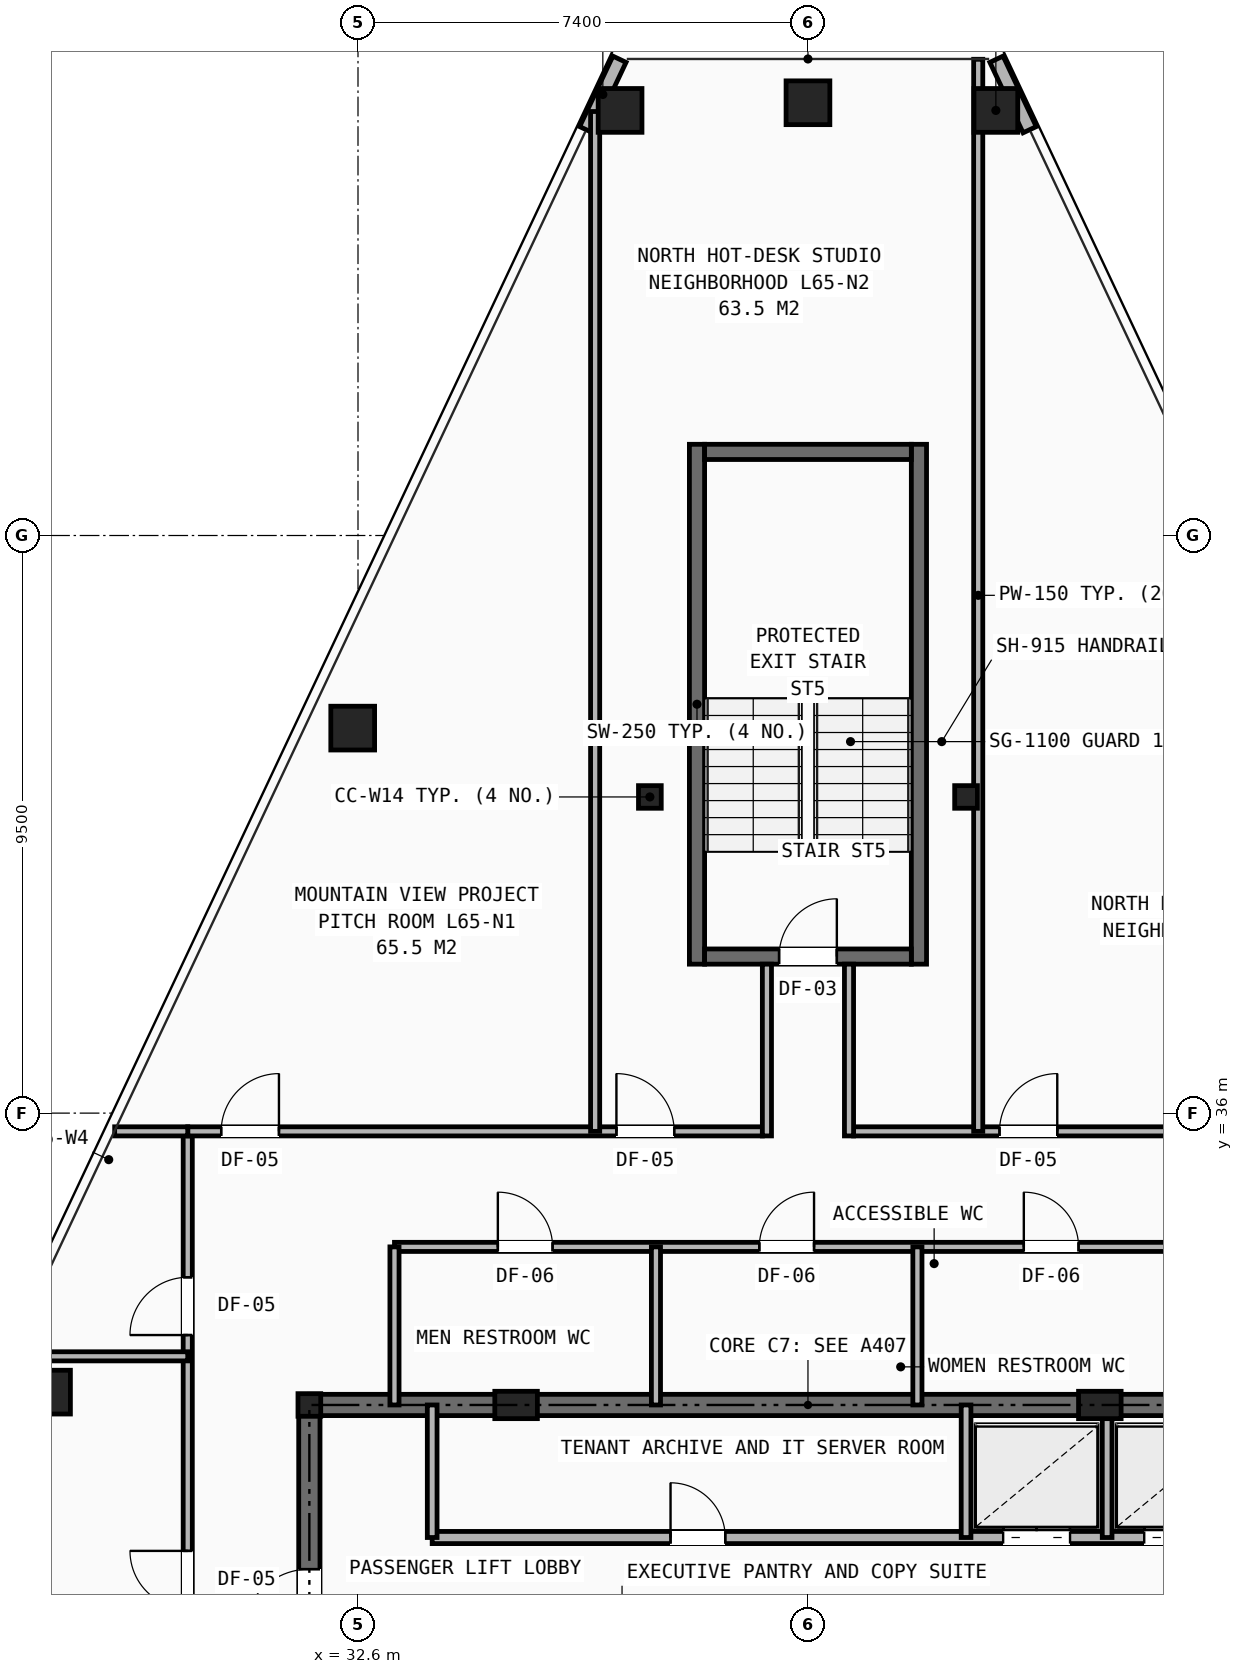
"""IFC4 building model, lengths in metres.
Left out: names, types, materials, properties, quantities, classifications, styles, units other than length and angle.
Written with IfcOpenShell. Run it as: python <this file> out.ifc"""

import sys

from ifc_helpers import new_model, si_unit, direction, frame, frame_2d, origin, origin_2d, place, context, subcontext, project, spatial, rectangle, hollow_rectangle, i_section, extrude, element, fill, save


model = new_model("IFC4")
c1 = context("Model", 3, precision=1e-05, world=origin(), true_north=direction((0.0, 1.0)))
c2 = subcontext(c1, "Body", "Model", "MODEL_VIEW")
j1 = project(units=[si_unit("LENGTHUNIT", "METRE"), si_unit("PLANEANGLEUNIT", "RADIAN")], contexts=[c1])
p1 = place(None, origin())
s1 = spatial("IfcSite", under=j1, at=p1, CompositionType="ELEMENT")
p2 = place(p1, origin())
s2 = spatial("IfcBuilding", under=s1, at=p2, CompositionType="ELEMENT")
p3 = place(p2, frame((0.0, 0.0, 229.4)))
s3 = spatial("IfcBuildingStorey", under=s2, at=p3, CompositionType="ELEMENT", Elevation=229.4)
for number, where, z_axis, x_axis in (
    (1, (31.8, 31.2, 0.0), (0.0, 0.0, 1.0), (1.0, 0.0, 0.0)),
    (2, (37.4, 41.2, 0.0), (0.0, 0.0, 1.0), (1.0, 0.0, 0.0)),
    (3, (42.6, 41.2, 0.0), (0.0, 0.0, 1.0), (1.0, 0.0, 0.0)),
):
    element("IfcColumn", number, at=place(p3, frame(where, z_axis=z_axis, x_axis=x_axis)), inside=s3, PredefinedType="COLUMN", context=c2, shape_type="SweptSolid", body=[
        extrude(i_section(OverallWidth=0.374, OverallDepth=0.372, WebThickness=0.016, FlangeThickness=0.026, at=origin_2d()), origin(), (0.0, 0.0, 1.0), 3.5),
    ])
for number, where, z_axis, x_axis in (
    (4, (35.2, 31.2, 0.0), (0.0, 0.0, 1.0), (1.0, 0.0, 0.0)),
    (5, (44.8, 31.2, 0.0), (0.0, 0.0, 1.0), (1.0, 0.0, 0.0)),
):
    element("IfcColumn", number, at=place(p3, frame(where, z_axis=z_axis, x_axis=x_axis)), inside=s3, PredefinedType="PILASTER", context=c2, shape_type="SweptSolid", body=[
        extrude(rectangle(XDim=0.7, YDim=0.45, at=origin_2d()), origin(), (0.0, 0.0, 1.0), 3.5),
    ])
for number, where, z_axis, x_axis in (
    (6, (43.09, 52.491, 0.0), (0.0, 0.0, 1.0), (1.0, 0.0, 0.0)),
    (7, (40.0, 52.617, 0.0), (0.0, 0.0, 1.0), (1.0, 0.0, 0.0)),
    (8, (36.91, 52.491, 0.0), (0.0, 0.0, 1.0), (1.0, 0.0, 0.0)),
    (9, (32.513, 42.332, 0.0), (0.0, 0.0, 1.0), (1.0, 0.0, 0.0)),
    (10, (27.51, 31.411, 0.0), (0.0, 0.0, 1.0), (1.0, 0.0, 0.0)),
):
    element("IfcColumn", number, at=place(p3, frame(where, z_axis=z_axis, x_axis=x_axis)), inside=s3, PredefinedType="COLUMN", context=c2, shape_type="SweptSolid", body=[
        extrude(hollow_rectangle(XDim=0.72, YDim=0.72, WallThickness=0.05, at=origin_2d()), origin(), (0.0, 0.0, 1.0), 3.5),
    ])
for number, where, z_axis, x_axis in (
    (11, (36.9, 53.333, 0.0), (0.0, 0.0, 1.0), (-0.426, -0.905, 0.0)),
    (12, (43.646, 52.174, 0.0), (0.0, 0.0, 1.0), (-0.426, 0.905, 0.0)),
):
    element("IfcWall", number, at=place(p3, frame(where, z_axis=z_axis, x_axis=x_axis)), inside=s3, PredefinedType="SHEAR", context=c2, shape_type="SweptSolid", body=[
        extrude(rectangle(XDim=1.281, YDim=0.24, at=frame_2d((0.641, 0.0))), origin(), (0.0, 0.0, 1.0), 2.623),
    ])
p4 = place(p3, frame((31.8, 31.2, 0.0), z_axis=(0.0, 0.0, 1.0), x_axis=(1.0, 0.0, 0.0)))
e13 = element("IfcWall", 13, at=p4, inside=s3, PredefinedType="SHEAR", context=c2, shape_type="SweptSolid", body=[
    extrude(rectangle(XDim=16.4, YDim=0.35, at=frame_2d((8.2, 0.0))), origin(), (0.0, 0.0, 1.0), 3.25),
])
p5 = place(p3, frame((31.8, 16.4, 0.0), z_axis=(0.0, 0.0, 1.0), x_axis=(0.0, 1.0, 0.0)))
e14 = element("IfcWall", 14, at=p5, inside=s3, PredefinedType="SHEAR", context=c2, shape_type="SweptSolid", body=[
    extrude(rectangle(XDim=14.8, YDim=0.35, at=frame_2d((7.4, 0.0))), origin(), (0.0, 0.0, 1.0), 3.25),
])
p6 = place(p5, frame((11.0, 0.0, 0.0)))
e15 = element("IfcOpeningElement", 15, at=p6, cuts=e14, PredefinedType="OPENING", context=c2, shape_type="SweptSolid", body=[
    extrude(rectangle(XDim=1.1, YDim=2.15, at=frame_2d((0.55, 1.075))), frame((0.0, 0.185, 0.0), z_axis=(0.0, -1.0, 0.0), x_axis=(1.0, 0.0, 0.0)), (0.0, 0.0, 1.0), 0.37),
])
p7 = place(p3, frame((33.82, 29.02, 0.0), z_axis=(0.0, 0.0, 1.0), x_axis=(1.0, 0.0, 0.0)))
e16 = element("IfcWall", 16, at=p7, inside=s3, PredefinedType="SOLIDWALL", context=c2, shape_type="SweptSolid", body=[
    extrude(rectangle(XDim=14.38, YDim=0.2, at=frame_2d((7.19, 0.0))), origin(), (0.0, 0.0, 1.0), 2.705),
])
p8 = place(p7, frame((3.92, 0.0, 0.0)))
e17 = element("IfcOpeningElement", 17, at=p8, cuts=e16, PredefinedType="OPENING", context=c2, shape_type="SweptSolid", body=[
    extrude(rectangle(XDim=0.9, YDim=2.1, at=frame_2d((0.45, 1.05))), frame((0.0, 0.11, 0.0), z_axis=(0.0, -1.0, 0.0), x_axis=(1.0, 0.0, 0.0)), (0.0, 0.0, 1.0), 0.22),
])
p9 = place(p7, frame((9.39, 0.0, 0.0)))
e18 = element("IfcOpeningElement", 18, at=p9, cuts=e16, PredefinedType="OPENING", context=c2, shape_type="SweptSolid", body=[
    extrude(rectangle(XDim=1.1, YDim=2.15, at=frame_2d((0.55, 1.075))), frame((0.0, 0.11, 0.0), z_axis=(0.0, -1.0, 0.0), x_axis=(1.0, 0.0, 0.0)), (0.0, 0.0, 1.0), 0.22),
])
p10 = place(p7, frame((11.71, 0.0, 0.0)))
e19 = element("IfcOpeningElement", 19, at=p10, cuts=e16, PredefinedType="OPENING", context=c2, shape_type="SweptSolid", body=[
    extrude(rectangle(XDim=1.1, YDim=2.15, at=frame_2d((0.55, 1.075))), frame((0.0, 0.11, 0.0), z_axis=(0.0, -1.0, 0.0), x_axis=(1.0, 0.0, 0.0)), (0.0, 0.0, 1.0), 0.22),
])
for number, where, z_axis, x_axis in (
    (20, (33.82, 29.02, 0.0), (0.0, 0.0, 1.0), (0.0, 1.0, 0.0)),
    (21, (42.6, 29.02, 0.0), (0.0, 0.0, 1.0), (0.0, 1.0, 0.0)),
    (22, (44.92, 29.02, 0.0), (0.0, 0.0, 1.0), (0.0, 1.0, 0.0)),
):
    element("IfcWall", number, at=place(p3, frame(where, z_axis=z_axis, x_axis=x_axis)), inside=s3, PredefinedType="SOLIDWALL", context=c2, shape_type="SweptSolid", body=[
        extrude(rectangle(XDim=2.18, YDim=0.16, at=frame_2d((1.09, 0.0))), origin(), (0.0, 0.0, 1.0), 2.978),
    ])
p11 = place(p3, frame((33.2, 33.8, 0.0), z_axis=(0.0, 0.0, 1.0), x_axis=(1.0, 0.0, 0.0)))
e23 = element("IfcWall", 23, at=p11, inside=s3, PredefinedType="PARTITIONING", context=c2, shape_type="SweptSolid", body=[
    extrude(rectangle(XDim=13.0, YDim=0.15, at=frame_2d((6.5, 0.0))), origin(), (0.0, 0.0, 1.0), 3.25),
])
p12 = place(p11, frame((1.7, 0.0, 0.0)))
e24 = element("IfcOpeningElement", 24, at=p12, cuts=e23, PredefinedType="OPENING", context=c2, shape_type="SweptSolid", body=[
    extrude(rectangle(XDim=0.9, YDim=2.1, at=frame_2d((0.45, 1.05))), frame((0.0, 0.085, 0.0), z_axis=(0.0, -1.0, 0.0), x_axis=(1.0, 0.0, 0.0)), (0.0, 0.0, 1.0), 0.17),
])
p13 = place(p11, frame((6.0, 0.0, 0.0)))
e25 = element("IfcOpeningElement", 25, at=p13, cuts=e23, PredefinedType="OPENING", context=c2, shape_type="SweptSolid", body=[
    extrude(rectangle(XDim=0.9, YDim=2.1, at=frame_2d((0.45, 1.05))), frame((0.0, 0.085, 0.0), z_axis=(0.0, -1.0, 0.0), x_axis=(1.0, 0.0, 0.0)), (0.0, 0.0, 1.0), 0.17),
])
p14 = place(p11, frame((10.35, 0.0, 0.0)))
e26 = element("IfcOpeningElement", 26, at=p14, cuts=e23, PredefinedType="OPENING", context=c2, shape_type="SweptSolid", body=[
    extrude(rectangle(XDim=0.9, YDim=2.1, at=frame_2d((0.45, 1.05))), frame((0.0, 0.085, 0.0), z_axis=(0.0, -1.0, 0.0), x_axis=(1.0, 0.0, 0.0)), (0.0, 0.0, 1.0), 0.17),
])
for number, where, z_axis, x_axis in (
    (27, (33.2, 31.2, 0.0), (0.0, 0.0, 1.0), (0.0, 1.0, 0.0)),
    (28, (37.5, 31.2, 0.0), (0.0, 0.0, 1.0), (0.0, 1.0, 0.0)),
    (29, (41.8, 31.2, 0.0), (0.0, 0.0, 1.0), (0.0, 1.0, 0.0)),
):
    element("IfcWall", number, at=place(p3, frame(where, z_axis=z_axis, x_axis=x_axis)), inside=s3, PredefinedType="PARTITIONING", context=c2, shape_type="SweptSolid", body=[
        extrude(rectangle(XDim=2.6, YDim=0.15, at=frame_2d((1.3, 0.0))), origin(), (0.0, 0.0, 1.0), 2.978),
    ])
p15 = place(p3, frame((29.8, 16.4, 0.0), z_axis=(0.0, 0.0, 1.0), x_axis=(0.0, 1.0, 0.0)))
e30 = element("IfcWall", 30, at=p15, inside=s3, PredefinedType="PARTITIONING", context=c2, shape_type="SweptSolid", body=[
    extrude(rectangle(XDim=19.3, YDim=0.15, at=frame_2d((9.65, 0.0))), origin(), (0.0, 0.0, 1.0), 2.292),
])
p16 = place(p15, frame((0.35, 0.0, 0.0)))
e31 = element("IfcOpeningElement", 31, at=p16, cuts=e30, PredefinedType="OPENING", context=c2, shape_type="SweptSolid", body=[
    extrude(rectangle(XDim=0.95, YDim=2.1, at=frame_2d((0.475, 1.05))), frame((0.0, 0.085, 0.0), z_axis=(0.0, -1.0, 0.0), x_axis=(1.0, 0.0, 0.0)), (0.0, 0.0, 1.0), 0.17),
])
p17 = place(p15, frame((4.95, 0.0, 0.0)))
e32 = element("IfcOpeningElement", 32, at=p17, cuts=e30, PredefinedType="OPENING", context=c2, shape_type="SweptSolid", body=[
    extrude(rectangle(XDim=0.95, YDim=2.1, at=frame_2d((0.475, 1.05))), frame((0.0, 0.085, 0.0), z_axis=(0.0, -1.0, 0.0), x_axis=(1.0, 0.0, 0.0)), (0.0, 0.0, 1.0), 0.17),
])
p18 = place(p15, frame((11.45, 0.0, 0.0)))
e33 = element("IfcOpeningElement", 33, at=p18, cuts=e30, PredefinedType="OPENING", context=c2, shape_type="SweptSolid", body=[
    extrude(rectangle(XDim=0.95, YDim=2.1, at=frame_2d((0.475, 1.05))), frame((0.0, 0.085, 0.0), z_axis=(0.0, -1.0, 0.0), x_axis=(1.0, 0.0, 0.0)), (0.0, 0.0, 1.0), 0.17),
])
p19 = place(p15, frame((15.95, 0.0, 0.0)))
e34 = element("IfcOpeningElement", 34, at=p19, cuts=e30, PredefinedType="OPENING", context=c2, shape_type="SweptSolid", body=[
    extrude(rectangle(XDim=0.95, YDim=2.1, at=frame_2d((0.475, 1.05))), frame((0.0, 0.085, 0.0), z_axis=(0.0, -1.0, 0.0), x_axis=(1.0, 0.0, 0.0)), (0.0, 0.0, 1.0), 0.17),
])
p20 = place(p3, frame((29.8, 35.7, 0.0), z_axis=(0.0, 0.0, 1.0), x_axis=(1.0, 0.0, 0.0)))
e35 = element("IfcWall", 35, at=p20, inside=s3, PredefinedType="PARTITIONING", context=c2, shape_type="SweptSolid", body=[
    extrude(rectangle(XDim=9.45, YDim=0.15, at=frame_2d((4.725, 0.0))), origin(), (0.0, 0.0, 1.0), 2.628),
])
p21 = place(p20, frame((0.55, 0.0, 0.0)))
e36 = element("IfcOpeningElement", 36, at=p21, cuts=e35, PredefinedType="OPENING", context=c2, shape_type="SweptSolid", body=[
    extrude(rectangle(XDim=0.95, YDim=2.1, at=frame_2d((0.475, 1.05))), frame((0.0, 0.085, 0.0), z_axis=(0.0, -1.0, 0.0), x_axis=(1.0, 0.0, 0.0)), (0.0, 0.0, 1.0), 0.17),
])
p22 = place(p20, frame((7.05, 0.0, 0.0)))
e37 = element("IfcOpeningElement", 37, at=p22, cuts=e35, PredefinedType="OPENING", context=c2, shape_type="SweptSolid", body=[
    extrude(rectangle(XDim=0.95, YDim=2.1, at=frame_2d((0.475, 1.05))), frame((0.0, 0.085, 0.0), z_axis=(0.0, -1.0, 0.0), x_axis=(1.0, 0.0, 0.0)), (0.0, 0.0, 1.0), 0.17),
])
p23 = place(p3, frame((40.75, 35.7, 0.0), z_axis=(0.0, 0.0, 1.0), x_axis=(1.0, 0.0, 0.0)))
e38 = element("IfcWall", 38, at=p23, inside=s3, PredefinedType="PARTITIONING", context=c2, shape_type="SweptSolid", body=[
    extrude(rectangle(XDim=6.05, YDim=0.15, at=frame_2d((3.025, 0.0))), origin(), (0.0, 0.0, 1.0), 3.25),
])
p24 = place(p23, frame((2.4, 0.0, 0.0)))
e39 = element("IfcOpeningElement", 39, at=p24, cuts=e38, PredefinedType="OPENING", context=c2, shape_type="SweptSolid", body=[
    extrude(rectangle(XDim=0.95, YDim=2.1, at=frame_2d((0.475, 1.05))), frame((0.0, 0.085, 0.0), z_axis=(0.0, -1.0, 0.0), x_axis=(1.0, 0.0, 0.0)), (0.0, 0.0, 1.0), 0.17),
])
p25 = place(p3, frame((28.598, 35.7, 0.0), z_axis=(0.0, 0.0, 1.0), x_axis=(1.0, 0.0, 0.0)))
e40 = element("IfcWall", 40, at=p25, inside=s3, PredefinedType="PARTITIONING", context=c2, shape_type="SweptSolid", body=[
    extrude(rectangle(XDim=1.202, YDim=0.15, at=frame_2d((0.601, 0.0))), origin(), (0.0, 0.0, 1.0), 2.628),
])
p26 = place(p3, frame((26.855, 32.0, 0.0), z_axis=(0.0, 0.0, 1.0), x_axis=(1.0, 0.0, 0.0)))
e41 = element("IfcWall", 41, at=p26, inside=s3, PredefinedType="PARTITIONING", context=c2, shape_type="SweptSolid", body=[
    extrude(rectangle(XDim=2.945, YDim=0.15, at=frame_2d((1.473, 0.0))), origin(), (0.0, 0.0, 1.0), 2.628),
])
p27 = place(p3, frame((36.5, 35.7, 0.0), z_axis=(0.0, 0.0, 1.0), x_axis=(0.0, 1.0, 0.0)))
e42 = element("IfcWall", 42, at=p27, inside=s3, PredefinedType="PARTITIONING", context=c2, shape_type="SweptSolid", body=[
    extrude(rectangle(XDim=16.773, YDim=0.15, at=frame_2d((8.387, 0.0))), origin(), (0.0, 0.0, 1.0), 2.292),
])
p28 = place(p3, frame((42.8, 35.7, 0.0), z_axis=(0.0, 0.0, 1.0), x_axis=(0.0, 1.0, 0.0)))
e43 = element("IfcWall", 43, at=p28, inside=s3, PredefinedType="PARTITIONING", context=c2, shape_type="SweptSolid", body=[
    extrude(rectangle(XDim=17.633, YDim=0.15, at=frame_2d((8.816, 0.0))), origin(), (0.0, 0.0, 1.0), 2.292),
])
for number, where, z_axis, x_axis in (
    (44, (38.175, 38.45, 0.0), (0.0, 0.0, 1.0), (0.0, 1.0, 0.0)),
    (45, (41.825, 38.45, 0.0), (0.0, 0.0, 1.0), (0.0, 1.0, 0.0)),
):
    element("IfcWall", number, at=place(p3, frame(where, z_axis=z_axis, x_axis=x_axis)), inside=s3, PredefinedType="SHEAR", context=c2, shape_type="SweptSolid", body=[
        extrude(rectangle(XDim=8.55, YDim=0.25, at=frame_2d((4.275, 0.0))), origin(), (0.0, 0.0, 1.0), 3.25),
    ])
p29 = place(p3, frame((38.3, 38.575, 0.0), z_axis=(0.0, 0.0, 1.0), x_axis=(1.0, 0.0, 0.0)))
e46 = element("IfcWall", 46, at=p29, inside=s3, PredefinedType="SHEAR", context=c2, shape_type="SweptSolid", body=[
    extrude(rectangle(XDim=3.4, YDim=0.25, at=frame_2d((1.7, 0.0))), origin(), (0.0, 0.0, 1.0), 3.25),
])
p30 = place(p29, frame((1.225, 0.0, 0.0)))
e47 = element("IfcOpeningElement", 47, at=p30, cuts=e46, PredefinedType="OPENING", context=c2, shape_type="SweptSolid", body=[
    extrude(rectangle(XDim=0.95, YDim=2.1, at=frame_2d((0.475, 1.05))), frame((0.0, 0.135, 0.0), z_axis=(0.0, -1.0, 0.0), x_axis=(1.0, 0.0, 0.0)), (0.0, 0.0, 1.0), 0.27),
])
p31 = place(p3, frame((38.3, 46.875, 0.0), z_axis=(0.0, 0.0, 1.0), x_axis=(1.0, 0.0, 0.0)))
e48 = element("IfcWall", 48, at=p31, inside=s3, PredefinedType="SHEAR", context=c2, shape_type="SweptSolid", body=[
    extrude(rectangle(XDim=3.4, YDim=0.25, at=frame_2d((1.7, 0.0))), origin(), (0.0, 0.0, 1.0), 3.25),
])
for number, where, z_axis, x_axis in (
    (49, (39.325, 35.625, 0.0), (0.0, 0.0, 1.0), (0.0, 1.0, 0.0)),
    (50, (40.675, 35.625, 0.0), (0.0, 0.0, 1.0), (0.0, 1.0, 0.0)),
):
    element("IfcWall", number, at=place(p3, frame(where, z_axis=z_axis, x_axis=x_axis)), inside=s3, PredefinedType="PARTITIONING", context=c2, shape_type="SweptSolid", body=[
        extrude(rectangle(XDim=2.825, YDim=0.15, at=frame_2d((1.413, 0.0))), origin(), (0.0, 0.0, 1.0), 3.25),
    ])
p32 = place(p6, origin())
e51 = element("IfcDoor", 51, at=p32, inside=s3, OperationType="SINGLE_SWING_LEFT", PredefinedType="DOOR", context=c2, shape_type="SweptSolid", body=[
    extrude(rectangle(XDim=1.1, YDim=2.15, at=frame_2d((0.55, 1.075))), frame((0.0, 0.025, 0.0), z_axis=(0.0, -1.0, 0.0), x_axis=(1.0, 0.0, 0.0)), (0.0, 0.0, 1.0), 0.05),
])
fill(e15, e51)
p33 = place(p8, origin())
e52 = element("IfcDoor", 52, at=p33, inside=s3, OperationType="SINGLE_SWING_LEFT", PredefinedType="DOOR", context=c2, shape_type="SweptSolid", body=[
    extrude(rectangle(XDim=0.9, YDim=2.1, at=frame_2d((0.45, 1.05))), frame((0.0, 0.025, 0.0), z_axis=(0.0, -1.0, 0.0), x_axis=(1.0, 0.0, 0.0)), (0.0, 0.0, 1.0), 0.05),
])
fill(e17, e52)
p34 = place(p9, origin())
e53 = element("IfcDoor", 53, at=p34, inside=s3, OperationType="DOUBLE_DOOR_SLIDING", PredefinedType="DOOR", context=c2, shape_type="SweptSolid", body=[
    extrude(rectangle(XDim=1.1, YDim=2.15, at=frame_2d((0.55, 1.075))), frame((0.0, 0.025, 0.0), z_axis=(0.0, -1.0, 0.0), x_axis=(1.0, 0.0, 0.0)), (0.0, 0.0, 1.0), 0.05),
])
fill(e18, e53)
p35 = place(p10, origin())
e54 = element("IfcDoor", 54, at=p35, inside=s3, OperationType="DOUBLE_DOOR_SLIDING", PredefinedType="DOOR", context=c2, shape_type="SweptSolid", body=[
    extrude(rectangle(XDim=1.1, YDim=2.15, at=frame_2d((0.55, 1.075))), frame((0.0, 0.025, 0.0), z_axis=(0.0, -1.0, 0.0), x_axis=(1.0, 0.0, 0.0)), (0.0, 0.0, 1.0), 0.05),
])
fill(e19, e54)
p36 = place(p12, origin())
e55 = element("IfcDoor", 55, at=p36, inside=s3, OperationType="SINGLE_SWING_LEFT", PredefinedType="DOOR", context=c2, shape_type="SweptSolid", body=[
    extrude(rectangle(XDim=0.9, YDim=2.1, at=frame_2d((0.45, 1.05))), frame((0.0, 0.025, 0.0), z_axis=(0.0, -1.0, 0.0), x_axis=(1.0, 0.0, 0.0)), (0.0, 0.0, 1.0), 0.05),
])
fill(e24, e55)
p37 = place(p13, origin())
e56 = element("IfcDoor", 56, at=p37, inside=s3, OperationType="SINGLE_SWING_RIGHT", PredefinedType="DOOR", context=c2, shape_type="SweptSolid", body=[
    extrude(rectangle(XDim=0.9, YDim=2.1, at=frame_2d((0.45, 1.05))), frame((0.0, 0.025, 0.0), z_axis=(0.0, -1.0, 0.0), x_axis=(1.0, 0.0, 0.0)), (0.0, 0.0, 1.0), 0.05),
])
fill(e25, e56)
p38 = place(p14, origin())
e57 = element("IfcDoor", 57, at=p38, inside=s3, OperationType="SINGLE_SWING_LEFT", PredefinedType="DOOR", context=c2, shape_type="SweptSolid", body=[
    extrude(rectangle(XDim=0.9, YDim=2.1, at=frame_2d((0.45, 1.05))), frame((0.0, 0.025, 0.0), z_axis=(0.0, -1.0, 0.0), x_axis=(1.0, 0.0, 0.0)), (0.0, 0.0, 1.0), 0.05),
])
fill(e26, e57)
p39 = place(p18, origin())
e58 = element("IfcDoor", 58, at=p39, inside=s3, OperationType="SINGLE_SWING_RIGHT", PredefinedType="DOOR", context=c2, shape_type="SweptSolid", body=[
    extrude(rectangle(XDim=0.95, YDim=2.1, at=frame_2d((0.475, 1.05))), frame((0.0, 0.025, 0.0), z_axis=(0.0, -1.0, 0.0), x_axis=(1.0, 0.0, 0.0)), (0.0, 0.0, 1.0), 0.05),
])
fill(e33, e58)
p40 = place(p19, origin())
e59 = element("IfcDoor", 59, at=p40, inside=s3, OperationType="SINGLE_SWING_LEFT", PredefinedType="DOOR", context=c2, shape_type="SweptSolid", body=[
    extrude(rectangle(XDim=0.95, YDim=2.1, at=frame_2d((0.475, 1.05))), frame((0.0, 0.025, 0.0), z_axis=(0.0, -1.0, 0.0), x_axis=(1.0, 0.0, 0.0)), (0.0, 0.0, 1.0), 0.05),
])
fill(e34, e59)
p41 = place(p21, origin())
e60 = element("IfcDoor", 60, at=p41, inside=s3, OperationType="SINGLE_SWING_RIGHT", PredefinedType="DOOR", context=c2, shape_type="SweptSolid", body=[
    extrude(rectangle(XDim=0.95, YDim=2.1, at=frame_2d((0.475, 1.05))), frame((0.0, 0.025, 0.0), z_axis=(0.0, -1.0, 0.0), x_axis=(1.0, 0.0, 0.0)), (0.0, 0.0, 1.0), 0.05),
])
fill(e36, e60)
p42 = place(p22, origin())
e61 = element("IfcDoor", 61, at=p42, inside=s3, OperationType="SINGLE_SWING_LEFT", PredefinedType="DOOR", context=c2, shape_type="SweptSolid", body=[
    extrude(rectangle(XDim=0.95, YDim=2.1, at=frame_2d((0.475, 1.05))), frame((0.0, 0.025, 0.0), z_axis=(0.0, -1.0, 0.0), x_axis=(1.0, 0.0, 0.0)), (0.0, 0.0, 1.0), 0.05),
])
fill(e37, e61)
p43 = place(p24, origin())
e62 = element("IfcDoor", 62, at=p43, inside=s3, OperationType="SINGLE_SWING_RIGHT", PredefinedType="DOOR", context=c2, shape_type="SweptSolid", body=[
    extrude(rectangle(XDim=0.95, YDim=2.1, at=frame_2d((0.475, 1.05))), frame((0.0, 0.025, 0.0), z_axis=(0.0, -1.0, 0.0), x_axis=(1.0, 0.0, 0.0)), (0.0, 0.0, 1.0), 0.05),
])
fill(e39, e62)
p44 = place(p30, origin())
e63 = element("IfcDoor", 63, at=p44, inside=s3, OperationType="SINGLE_SWING_RIGHT", PredefinedType="DOOR", context=c2, shape_type="SweptSolid", body=[
    extrude(rectangle(XDim=0.95, YDim=2.1, at=frame_2d((0.475, 1.05))), frame((0.0, 0.025, 0.0), z_axis=(0.0, -1.0, 0.0), x_axis=(1.0, 0.0, 0.0)), (0.0, 0.0, 1.0), 0.05),
])
fill(e47, e63)
save(model, sys.argv[1])
